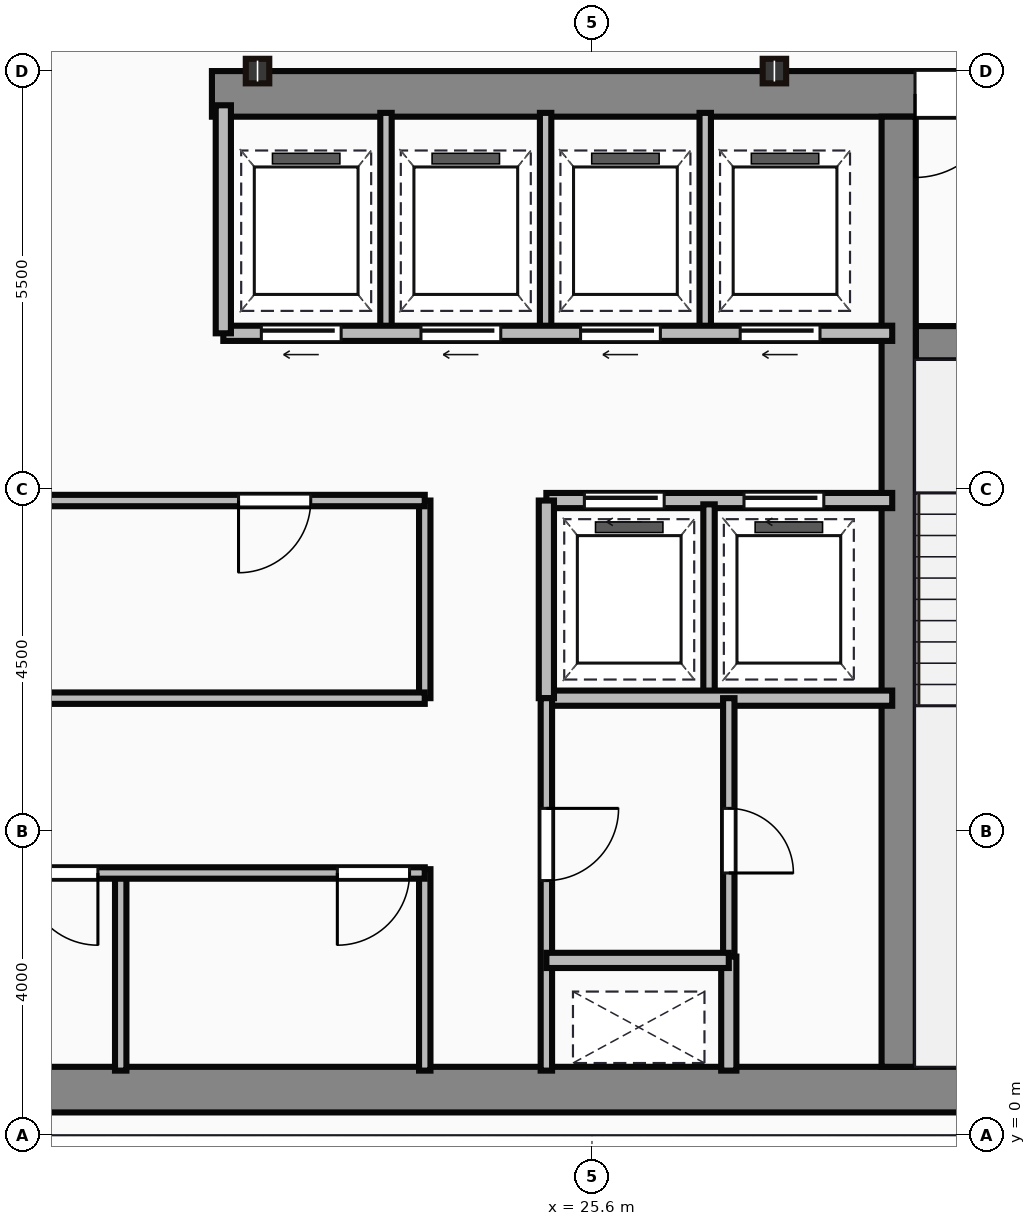
"""IFC4 building model, lengths in metres.
Left out: names, types, materials, properties, quantities, classifications, styles, units other than length and angle.
Written with IfcOpenShell. Run it as: python <this file> out.ifc"""

import sys

from ifc_helpers import new_model, si_unit, direction, frame, frame_2d, origin, origin_2d, place, context, subcontext, project, spatial, rectangle, i_section, extrude, source, transform, mapped, element, fill, save


model = new_model("IFC4")
c1 = context("Model", 3, precision=1e-05, world=origin(), true_north=direction((0.0, 1.0)))
c2 = subcontext(c1, "Body", "Model", "MODEL_VIEW")
j1 = project(units=[si_unit("LENGTHUNIT", "METRE"), si_unit("PLANEANGLEUNIT", "RADIAN")], contexts=[c1])
p1 = place(None, origin())
s1 = spatial("IfcSite", under=j1, at=p1, CompositionType="ELEMENT")
p2 = place(p1, origin())
s2 = spatial("IfcBuilding", under=s1, at=p2, CompositionType="ELEMENT")
p3 = place(p2, frame((0.0, 0.0, 255.15)))
s3 = spatial("IfcBuildingStorey", under=s2, at=p3, CompositionType="ELEMENT", Elevation=255.15)
m1 = source(origin(), c2, "Body", "SweptSolid", [
    extrude(rectangle(XDim=29.5, YDim=0.6, at=frame_2d((14.75, 0.0))), origin(), (0.0, 0.0, 1.0), 3.65),
])
p4 = place(p3, frame((4.5, 0.6, 0.0), z_axis=(0.0, 0.0, 1.0), x_axis=(1.0, 0.0, 0.0)))
e1 = element("IfcWall", 1, at=p4, inside=s3, PredefinedType="SHEAR", context=c2, shape_type="MappedRepresentation", body=[
    mapped(m1, transform((0.0, 0.0, 0.0))),
])
m2 = source(origin(), c2, "Body", "SweptSolid", [
    extrude(rectangle(XDim=12.6, YDim=0.6, at=frame_2d((6.3, 0.0))), origin(), (0.0, 0.0, 1.0), 3.65),
])
p5 = place(p3, frame((20.6, 13.7, 0.0), z_axis=(0.0, 0.0, 1.0), x_axis=(1.0, 0.0, 0.0)))
e2 = element("IfcWall", 2, at=p5, inside=s3, PredefinedType="SHEAR", context=c2, shape_type="MappedRepresentation", body=[
    mapped(m2, transform((0.0, 0.0, 0.0))),
])
p6 = place(p5, frame((9.25, 0.0, 0.0)))
e3 = element("IfcOpeningElement", 3, at=p6, cuts=e2, PredefinedType="OPENING", context=c2, shape_type="SweptSolid", body=[
    extrude(rectangle(XDim=1.1, YDim=2.15, at=frame_2d((0.55, 1.075))), frame((0.0, 0.31, 0.0), z_axis=(0.0, -1.0, 0.0), x_axis=(1.0, 0.0, 0.0)), (0.0, 0.0, 1.0), 0.62),
])
m3 = source(origin(), c2, "Body", "SweptSolid", [
    extrude(rectangle(XDim=12.5, YDim=0.45, at=frame_2d((6.25, 0.0))), origin(), (0.0, 0.0, 1.0), 3.65),
])
p7 = place(p3, frame((29.635, 0.9, 0.0), z_axis=(0.0, 0.0, 1.0), x_axis=(0.0, 1.0, 0.0)))
e4 = element("IfcWall", 4, at=p7, inside=s3, PredefinedType="SHEAR", context=c2, shape_type="MappedRepresentation", body=[
    mapped(m3, transform((0.0, 0.0, 0.0))),
])
m4 = source(origin(), c2, "Body", "SweptSolid", [
    extrude(rectangle(XDim=3.39, YDim=0.45, at=frame_2d((1.695, 0.0))), origin(), (0.0, 0.0, 1.0), 3.65),
])
p8 = place(p3, frame((29.86, 10.42, 0.0), z_axis=(0.0, 0.0, 1.0), x_axis=(1.0, 0.0, 0.0)))
e5 = element("IfcWall", 5, at=p8, inside=s3, PredefinedType="SHEAR", context=c2, shape_type="MappedRepresentation", body=[
    mapped(m4, transform((0.0, 0.0, 0.0))),
])
p9 = place(p8, frame((1.1, 0.0, 0.0)))
e6 = element("IfcOpeningElement", 6, at=p9, cuts=e5, PredefinedType="OPENING", context=c2, shape_type="SweptSolid", body=[
    extrude(rectangle(XDim=1.1, YDim=2.15, at=frame_2d((0.55, 1.075))), frame((0.0, 0.235, 0.0), z_axis=(0.0, -1.0, 0.0), x_axis=(1.0, 0.0, 0.0)), (0.0, 0.0, 1.0), 0.47),
])
m5 = source(origin(), c2, "Body", "SweptSolid", [
    extrude(i_section(OverallWidth=0.309, OverallDepth=0.323, WebThickness=0.014, FlangeThickness=0.023, at=origin_2d()), origin(), (0.0, 0.0, 1.0), 3.65),
])
for number, where, z_axis, x_axis in (
    (7, (21.2, 14.0, 0.0), (0.0, 0.0, 1.0), (1.0, 0.0, 0.0)),
    (8, (28.0, 14.0, 0.0), (0.0, 0.0, 1.0), (1.0, 0.0, 0.0)),
):
    element("IfcColumn", number, at=place(p3, frame(where, z_axis=z_axis, x_axis=x_axis)), inside=s3, PredefinedType="COLUMN", context=c2, shape_type="MappedRepresentation", body=[
        mapped(m5, transform((0.0, 0.0, 0.0))),
    ])
m6 = source(origin(), c2, "Body", "SweptSolid", [
    extrude(rectangle(XDim=10.35, YDim=0.15, at=frame_2d((5.175, 0.0))), origin(), (0.0, 0.0, 1.0), 3.4),
])
p10 = place(p3, frame((13.05, 3.45, 0.0), z_axis=(0.0, 0.0, 1.0), x_axis=(1.0, 0.0, 0.0)))
e9 = element("IfcWall", 9, at=p10, inside=s3, PredefinedType="PARTITIONING", context=c2, shape_type="MappedRepresentation", body=[
    mapped(m6, transform((0.0, 0.0, 0.0))),
])
p11 = place(p10, frame((1.1, 0.0, 0.0)))
e10 = element("IfcOpeningElement", 10, at=p11, cuts=e9, PredefinedType="OPENING", context=c2, shape_type="SweptSolid", body=[
    extrude(rectangle(XDim=0.95, YDim=2.15, at=frame_2d((0.475, 1.075))), frame((0.0, 0.085, 0.0), z_axis=(0.0, -1.0, 0.0), x_axis=(1.0, 0.0, 0.0)), (0.0, 0.0, 1.0), 0.17),
])
p12 = place(p10, frame((5.1, 0.0, 0.0)))
e11 = element("IfcOpeningElement", 11, at=p12, cuts=e9, PredefinedType="OPENING", context=c2, shape_type="SweptSolid", body=[
    extrude(rectangle(XDim=0.95, YDim=2.15, at=frame_2d((0.475, 1.075))), frame((0.0, 0.085, 0.0), z_axis=(0.0, -1.0, 0.0), x_axis=(1.0, 0.0, 0.0)), (0.0, 0.0, 1.0), 0.17),
])
p13 = place(p10, frame((9.2, 0.0, 0.0)))
e12 = element("IfcOpeningElement", 12, at=p13, cuts=e9, PredefinedType="OPENING", context=c2, shape_type="SweptSolid", body=[
    extrude(rectangle(XDim=0.95, YDim=2.15, at=frame_2d((0.475, 1.075))), frame((0.0, 0.085, 0.0), z_axis=(0.0, -1.0, 0.0), x_axis=(1.0, 0.0, 0.0)), (0.0, 0.0, 1.0), 0.17),
])
m7 = source(origin(), c2, "Body", "SweptSolid", [
    extrude(rectangle(XDim=2.65, YDim=0.15, at=frame_2d((1.325, 0.0))), origin(), (0.0, 0.0, 1.0), 3.4),
])
p14 = place(p3, frame((23.4, 0.85, 0.0), z_axis=(0.0, 0.0, 1.0), x_axis=(0.0, 1.0, 0.0)))
e13 = element("IfcWall", 13, at=p14, inside=s3, PredefinedType="PARTITIONING", context=c2, shape_type="MappedRepresentation", body=[
    mapped(m7, transform((0.0, 0.0, 0.0))),
])
m8 = source(origin(), c2, "Body", "SweptSolid", [
    extrude(rectangle(XDim=2.6, YDim=0.15, at=frame_2d((1.3, 0.0))), origin(), (0.0, 0.0, 1.0), 3.4),
])
p15 = place(p3, frame((19.4, 0.85, 0.0), z_axis=(0.0, 0.0, 1.0), x_axis=(0.0, 1.0, 0.0)))
e14 = element("IfcWall", 14, at=p15, inside=s3, PredefinedType="PARTITIONING", context=c2, shape_type="MappedRepresentation", body=[
    mapped(m8, transform((0.0, 0.0, 0.0))),
])
m9 = source(origin(), c2, "Body", "SweptSolid", [
    extrude(rectangle(XDim=11.85, YDim=0.15, at=frame_2d((5.925, 0.0))), origin(), (0.0, 0.0, 1.0), 3.4),
])
p16 = place(p3, frame((11.55, 5.75, 0.0), z_axis=(0.0, 0.0, 1.0), x_axis=(1.0, 0.0, 0.0)))
e15 = element("IfcWall", 15, at=p16, inside=s3, PredefinedType="PARTITIONING", context=c2, shape_type="MappedRepresentation", body=[
    mapped(m9, transform((0.0, 0.0, 0.0))),
])
p17 = place(p3, frame((11.55, 8.35, 0.0), z_axis=(0.0, 0.0, 1.0), x_axis=(1.0, 0.0, 0.0)))
e16 = element("IfcWall", 16, at=p17, inside=s3, PredefinedType="PARTITIONING", context=c2, shape_type="MappedRepresentation", body=[
    mapped(m9, transform((0.0, 0.0, 0.0))),
])
p18 = place(p17, frame((1.1, 0.0, 0.0)))
e17 = element("IfcOpeningElement", 17, at=p18, cuts=e16, PredefinedType="OPENING", context=c2, shape_type="SweptSolid", body=[
    extrude(rectangle(XDim=0.95, YDim=2.15, at=frame_2d((0.475, 1.075))), frame((0.0, 0.085, 0.0), z_axis=(0.0, -1.0, 0.0), x_axis=(1.0, 0.0, 0.0)), (0.0, 0.0, 1.0), 0.17),
])
p19 = place(p17, frame((9.4, 0.0, 0.0)))
e18 = element("IfcOpeningElement", 18, at=p19, cuts=e16, PredefinedType="OPENING", context=c2, shape_type="SweptSolid", body=[
    extrude(rectangle(XDim=0.95, YDim=2.15, at=frame_2d((0.475, 1.075))), frame((0.0, 0.085, 0.0), z_axis=(0.0, -1.0, 0.0), x_axis=(1.0, 0.0, 0.0)), (0.0, 0.0, 1.0), 0.17),
])
m10 = source(origin(), c2, "Body", "SweptSolid", [
    extrude(rectangle(XDim=2.6, YDim=0.15, at=frame_2d((1.3, 0.0))), origin(), (0.0, 0.0, 1.0), 3.4),
])
p20 = place(p3, frame((23.4, 5.75, 0.0), z_axis=(0.0, 0.0, 1.0), x_axis=(0.0, 1.0, 0.0)))
e19 = element("IfcWall", 19, at=p20, inside=s3, PredefinedType="PARTITIONING", context=c2, shape_type="MappedRepresentation", body=[
    mapped(m10, transform((0.0, 0.0, 0.0))),
])
m11 = source(origin(), c2, "Body", "SweptSolid", [
    extrude(rectangle(XDim=8.8, YDim=0.2, at=frame_2d((4.4, 0.0))), origin(), (0.0, 0.0, 1.0), 3.4),
])
p21 = place(p3, frame((20.75, 10.55, 0.0), z_axis=(0.0, 0.0, 1.0), x_axis=(1.0, 0.0, 0.0)))
e20 = element("IfcWall", 20, at=p21, inside=s3, PredefinedType="PARTITIONING", context=c2, shape_type="MappedRepresentation", body=[
    mapped(m11, transform((0.0, 0.0, 0.0))),
])
p22 = place(p21, frame((0.5, 0.0, 0.0)))
e21 = element("IfcOpeningElement", 21, at=p22, cuts=e20, PredefinedType="OPENING", context=c2, shape_type="SweptSolid", body=[
    extrude(rectangle(XDim=1.05, YDim=2.15, at=frame_2d((0.525, 1.075))), frame((0.0, 0.11, 0.0), z_axis=(0.0, -1.0, 0.0), x_axis=(1.0, 0.0, 0.0)), (0.0, 0.0, 1.0), 0.22),
])
p23 = place(p21, frame((2.6, 0.0, 0.0)))
e22 = element("IfcOpeningElement", 22, at=p23, cuts=e20, PredefinedType="OPENING", context=c2, shape_type="SweptSolid", body=[
    extrude(rectangle(XDim=1.05, YDim=2.15, at=frame_2d((0.525, 1.075))), frame((0.0, 0.11, 0.0), z_axis=(0.0, -1.0, 0.0), x_axis=(1.0, 0.0, 0.0)), (0.0, 0.0, 1.0), 0.22),
])
p24 = place(p21, frame((4.7, 0.0, 0.0)))
e23 = element("IfcOpeningElement", 23, at=p24, cuts=e20, PredefinedType="OPENING", context=c2, shape_type="SweptSolid", body=[
    extrude(rectangle(XDim=1.05, YDim=2.15, at=frame_2d((0.525, 1.075))), frame((0.0, 0.11, 0.0), z_axis=(0.0, -1.0, 0.0), x_axis=(1.0, 0.0, 0.0)), (0.0, 0.0, 1.0), 0.22),
])
p25 = place(p21, frame((6.8, 0.0, 0.0)))
e24 = element("IfcOpeningElement", 24, at=p25, cuts=e20, PredefinedType="OPENING", context=c2, shape_type="SweptSolid", body=[
    extrude(rectangle(XDim=1.05, YDim=2.15, at=frame_2d((0.525, 1.075))), frame((0.0, 0.11, 0.0), z_axis=(0.0, -1.0, 0.0), x_axis=(1.0, 0.0, 0.0)), (0.0, 0.0, 1.0), 0.22),
])
m12 = source(origin(), c2, "Body", "SweptSolid", [
    extrude(rectangle(XDim=3.0, YDim=0.2, at=frame_2d((1.5, 0.0))), origin(), (0.0, 0.0, 1.0), 3.4),
])
p26 = place(p3, frame((20.75, 10.55, 0.0), z_axis=(0.0, 0.0, 1.0), x_axis=(0.0, 1.0, 0.0)))
e25 = element("IfcWall", 25, at=p26, inside=s3, PredefinedType="PARTITIONING", context=c2, shape_type="MappedRepresentation", body=[
    mapped(m12, transform((0.0, 0.0, 0.0))),
])
m13 = source(origin(), c2, "Body", "SweptSolid", [
    extrude(rectangle(XDim=2.85, YDim=0.15, at=frame_2d((1.425, 0.0))), origin(), (0.0, 0.0, 1.0), 3.4),
])
for number, where, z_axis, x_axis in (
    (26, (22.89, 10.6, 0.0), (0.0, 0.0, 1.0), (0.0, 1.0, 0.0)),
    (27, (24.99, 10.6, 0.0), (0.0, 0.0, 1.0), (0.0, 1.0, 0.0)),
    (28, (27.09, 10.6, 0.0), (0.0, 0.0, 1.0), (0.0, 1.0, 0.0)),
):
    element("IfcWall", number, at=place(p3, frame(where, z_axis=z_axis, x_axis=x_axis)), inside=s3, PredefinedType="PARTITIONING", context=c2, shape_type="MappedRepresentation", body=[
        mapped(m13, transform((0.0, 0.0, 0.0))),
    ])
m14 = source(origin(), c2, "Body", "SweptSolid", [
    extrude(rectangle(XDim=4.55, YDim=0.2, at=frame_2d((2.275, 0.0))), origin(), (0.0, 0.0, 1.0), 3.4),
])
p27 = place(p3, frame((25.0, 8.35, 0.0), z_axis=(0.0, 0.0, 1.0), x_axis=(1.0, 0.0, 0.0)))
e29 = element("IfcWall", 29, at=p27, inside=s3, PredefinedType="PARTITIONING", context=c2, shape_type="MappedRepresentation", body=[
    mapped(m14, transform((0.0, 0.0, 0.0))),
])
p28 = place(p27, frame((0.5, 0.0, 0.0)))
e30 = element("IfcOpeningElement", 30, at=p28, cuts=e29, PredefinedType="OPENING", context=c2, shape_type="SweptSolid", body=[
    extrude(rectangle(XDim=1.05, YDim=2.15, at=frame_2d((0.525, 1.075))), frame((0.0, 0.11, 0.0), z_axis=(0.0, -1.0, 0.0), x_axis=(1.0, 0.0, 0.0)), (0.0, 0.0, 1.0), 0.22),
])
p29 = place(p27, frame((2.6, 0.0, 0.0)))
e31 = element("IfcOpeningElement", 31, at=p29, cuts=e29, PredefinedType="OPENING", context=c2, shape_type="SweptSolid", body=[
    extrude(rectangle(XDim=1.05, YDim=2.15, at=frame_2d((0.525, 1.075))), frame((0.0, 0.11, 0.0), z_axis=(0.0, -1.0, 0.0), x_axis=(1.0, 0.0, 0.0)), (0.0, 0.0, 1.0), 0.22),
])
p30 = place(p3, frame((25.0, 5.75, 0.0), z_axis=(0.0, 0.0, 1.0), x_axis=(1.0, 0.0, 0.0)))
e32 = element("IfcWall", 32, at=p30, inside=s3, PredefinedType="PARTITIONING", context=c2, shape_type="MappedRepresentation", body=[
    mapped(m14, transform((0.0, 0.0, 0.0))),
])
m15 = source(origin(), c2, "Body", "SweptSolid", [
    extrude(rectangle(XDim=2.6, YDim=0.2, at=frame_2d((1.3, 0.0))), origin(), (0.0, 0.0, 1.0), 3.4),
])
p31 = place(p3, frame((25.0, 5.75, 0.0), z_axis=(0.0, 0.0, 1.0), x_axis=(0.0, 1.0, 0.0)))
e33 = element("IfcWall", 33, at=p31, inside=s3, PredefinedType="PARTITIONING", context=c2, shape_type="MappedRepresentation", body=[
    mapped(m15, transform((0.0, 0.0, 0.0))),
])
m16 = source(origin(), c2, "Body", "SweptSolid", [
    extrude(rectangle(XDim=2.5, YDim=0.15, at=frame_2d((1.25, 0.0))), origin(), (0.0, 0.0, 1.0), 3.4),
])
p32 = place(p3, frame((27.14, 5.8, 0.0), z_axis=(0.0, 0.0, 1.0), x_axis=(0.0, 1.0, 0.0)))
e34 = element("IfcWall", 34, at=p32, inside=s3, PredefinedType="PARTITIONING", context=c2, shape_type="MappedRepresentation", body=[
    mapped(m16, transform((0.0, 0.0, 0.0))),
])
m17 = source(origin(), c2, "Body", "SweptSolid", [
    extrude(rectangle(XDim=4.9, YDim=0.15, at=frame_2d((2.45, 0.0))), origin(), (0.0, 0.0, 1.0), 3.4),
])
p33 = place(p3, frame((25.0, 0.85, 0.0), z_axis=(0.0, 0.0, 1.0), x_axis=(0.0, 1.0, 0.0)))
e35 = element("IfcWall", 35, at=p33, inside=s3, PredefinedType="PARTITIONING", context=c2, shape_type="MappedRepresentation", body=[
    mapped(m17, transform((0.0, 0.0, 0.0))),
])
p34 = place(p33, frame((2.5, 0.0, 0.0)))
e36 = element("IfcOpeningElement", 36, at=p34, cuts=e35, PredefinedType="OPENING", context=c2, shape_type="SweptSolid", body=[
    extrude(rectangle(XDim=0.95, YDim=2.15, at=frame_2d((0.475, 1.075))), frame((0.0, 0.085, 0.0), z_axis=(0.0, -1.0, 0.0), x_axis=(1.0, 0.0, 0.0)), (0.0, 0.0, 1.0), 0.17),
])
m18 = source(origin(), c2, "Body", "SweptSolid", [
    extrude(rectangle(XDim=2.4, YDim=0.2, at=frame_2d((1.2, 0.0))), origin(), (0.0, 0.0, 1.0), 3.4),
])
p35 = place(p3, frame((25.0, 2.3, 0.0), z_axis=(0.0, 0.0, 1.0), x_axis=(1.0, 0.0, 0.0)))
e37 = element("IfcWall", 37, at=p35, inside=s3, PredefinedType="PARTITIONING", context=c2, shape_type="MappedRepresentation", body=[
    mapped(m18, transform((0.0, 0.0, 0.0))),
])
m19 = source(origin(), c2, "Body", "SweptSolid", [
    extrude(rectangle(XDim=1.5, YDim=0.2, at=frame_2d((0.75, 0.0))), origin(), (0.0, 0.0, 1.0), 3.4),
])
p36 = place(p3, frame((27.4, 0.85, 0.0), z_axis=(0.0, 0.0, 1.0), x_axis=(0.0, 1.0, 0.0)))
e38 = element("IfcWall", 38, at=p36, inside=s3, PredefinedType="PARTITIONING", context=c2, shape_type="MappedRepresentation", body=[
    mapped(m19, transform((0.0, 0.0, 0.0))),
])
m20 = source(origin(), c2, "Body", "SweptSolid", [
    extrude(rectangle(XDim=3.4, YDim=0.15, at=frame_2d((1.7, 0.0))), origin(), (0.0, 0.0, 1.0), 3.4),
])
p37 = place(p3, frame((27.4, 2.35, 0.0), z_axis=(0.0, 0.0, 1.0), x_axis=(0.0, 1.0, 0.0)))
e39 = element("IfcWall", 39, at=p37, inside=s3, PredefinedType="PARTITIONING", context=c2, shape_type="MappedRepresentation", body=[
    mapped(m20, transform((0.0, 0.0, 0.0))),
])
p38 = place(p37, frame((1.1, 0.0, 0.0)))
e40 = element("IfcOpeningElement", 40, at=p38, cuts=e39, PredefinedType="OPENING", context=c2, shape_type="SweptSolid", body=[
    extrude(rectangle(XDim=0.85, YDim=2.1, at=frame_2d((0.425, 1.05))), frame((0.0, 0.085, 0.0), z_axis=(0.0, -1.0, 0.0), x_axis=(1.0, 0.0, 0.0)), (0.0, 0.0, 1.0), 0.17),
])
m21 = source(origin(), c2, "Body", "SweptSolid", [
    extrude(rectangle(XDim=1.1, YDim=2.15, at=frame_2d((0.55, 1.075))), frame((0.0, 0.025, 0.0), z_axis=(0.0, -1.0, 0.0), x_axis=(1.0, 0.0, 0.0)), (0.0, 0.0, 1.0), 0.05),
])
p39 = place(p6, origin())
e41 = element("IfcDoor", 41, at=p39, inside=s3, OperationType="SINGLE_SWING_LEFT", PredefinedType="DOOR", context=c2, shape_type="MappedRepresentation", body=[
    mapped(m21, transform((0.0, 0.0, 0.0))),
])
fill(e3, e41)
m22 = source(origin(), c2, "Body", "SweptSolid", [
    extrude(rectangle(XDim=0.95, YDim=2.15, at=frame_2d((0.475, 1.075))), frame((0.0, 0.025, 0.0), z_axis=(0.0, -1.0, 0.0), x_axis=(1.0, 0.0, 0.0)), (0.0, 0.0, 1.0), 0.05),
])
p40 = place(p12, origin())
e42 = element("IfcDoor", 42, at=p40, inside=s3, OperationType="SINGLE_SWING_RIGHT", PredefinedType="DOOR", context=c2, shape_type="MappedRepresentation", body=[
    mapped(m22, transform((0.0, 0.0, 0.0))),
])
fill(e11, e42)
p41 = place(p13, origin())
e43 = element("IfcDoor", 43, at=p41, inside=s3, OperationType="SINGLE_SWING_LEFT", PredefinedType="DOOR", context=c2, shape_type="MappedRepresentation", body=[
    mapped(m22, transform((0.0, 0.0, 0.0))),
])
fill(e12, e43)
p42 = place(p19, origin())
e44 = element("IfcDoor", 44, at=p42, inside=s3, OperationType="SINGLE_SWING_LEFT", PredefinedType="DOOR", context=c2, shape_type="MappedRepresentation", body=[
    mapped(m22, transform((0.0, 0.0, 0.0))),
])
fill(e18, e44)
m23 = source(origin(), c2, "Body", "SweptSolid", [
    extrude(rectangle(XDim=1.05, YDim=2.15, at=frame_2d((0.525, 1.075))), frame((0.0, 0.025, 0.0), z_axis=(0.0, -1.0, 0.0), x_axis=(1.0, 0.0, 0.0)), (0.0, 0.0, 1.0), 0.05),
])
p43 = place(p22, frame((1.05, 0.0, 0.0), z_axis=(0.0, 0.0, 1.0), x_axis=(-1.0, 0.0, 0.0)))
e45 = element("IfcDoor", 45, at=p43, inside=s3, OperationType="SLIDING_TO_LEFT", PredefinedType="DOOR", context=c2, shape_type="MappedRepresentation", body=[
    mapped(m23, transform((0.0, 0.0, 0.0))),
])
fill(e21, e45)
p44 = place(p23, frame((1.05, 0.0, 0.0), z_axis=(0.0, 0.0, 1.0), x_axis=(-1.0, 0.0, 0.0)))
e46 = element("IfcDoor", 46, at=p44, inside=s3, OperationType="SLIDING_TO_LEFT", PredefinedType="DOOR", context=c2, shape_type="MappedRepresentation", body=[
    mapped(m23, transform((0.0, 0.0, 0.0))),
])
fill(e22, e46)
p45 = place(p24, frame((1.05, 0.0, 0.0), z_axis=(0.0, 0.0, 1.0), x_axis=(-1.0, 0.0, 0.0)))
e47 = element("IfcDoor", 47, at=p45, inside=s3, OperationType="SLIDING_TO_LEFT", PredefinedType="DOOR", context=c2, shape_type="MappedRepresentation", body=[
    mapped(m23, transform((0.0, 0.0, 0.0))),
])
fill(e23, e47)
p46 = place(p25, frame((1.05, 0.0, 0.0), z_axis=(0.0, 0.0, 1.0), x_axis=(-1.0, 0.0, 0.0)))
e48 = element("IfcDoor", 48, at=p46, inside=s3, OperationType="SLIDING_TO_LEFT", PredefinedType="DOOR", context=c2, shape_type="MappedRepresentation", body=[
    mapped(m23, transform((0.0, 0.0, 0.0))),
])
fill(e24, e48)
p47 = place(p28, origin())
e49 = element("IfcDoor", 49, at=p47, inside=s3, OperationType="SLIDING_TO_LEFT", PredefinedType="DOOR", context=c2, shape_type="MappedRepresentation", body=[
    mapped(m23, transform((0.0, 0.0, 0.0))),
])
fill(e30, e49)
p48 = place(p29, origin())
e50 = element("IfcDoor", 50, at=p48, inside=s3, OperationType="SLIDING_TO_LEFT", PredefinedType="DOOR", context=c2, shape_type="MappedRepresentation", body=[
    mapped(m23, transform((0.0, 0.0, 0.0))),
])
fill(e31, e50)
p49 = place(p34, origin())
e51 = element("IfcDoor", 51, at=p49, inside=s3, OperationType="SINGLE_SWING_RIGHT", PredefinedType="DOOR", context=c2, shape_type="MappedRepresentation", body=[
    mapped(m22, transform((0.0, 0.0, 0.0))),
])
fill(e36, e51)
m24 = source(origin(), c2, "Body", "SweptSolid", [
    extrude(rectangle(XDim=0.85, YDim=2.1, at=frame_2d((0.425, 1.05))), frame((0.0, 0.025, 0.0), z_axis=(0.0, -1.0, 0.0), x_axis=(1.0, 0.0, 0.0)), (0.0, 0.0, 1.0), 0.05),
])
p50 = place(p38, frame((0.85, 0.0, 0.0), z_axis=(0.0, 0.0, 1.0), x_axis=(-1.0, 0.0, 0.0)))
e52 = element("IfcDoor", 52, at=p50, inside=s3, OperationType="SINGLE_SWING_LEFT", PredefinedType="DOOR", context=c2, shape_type="MappedRepresentation", body=[
    mapped(m24, transform((0.0, 0.0, 0.0))),
])
fill(e40, e52)
save(model, sys.argv[1])
